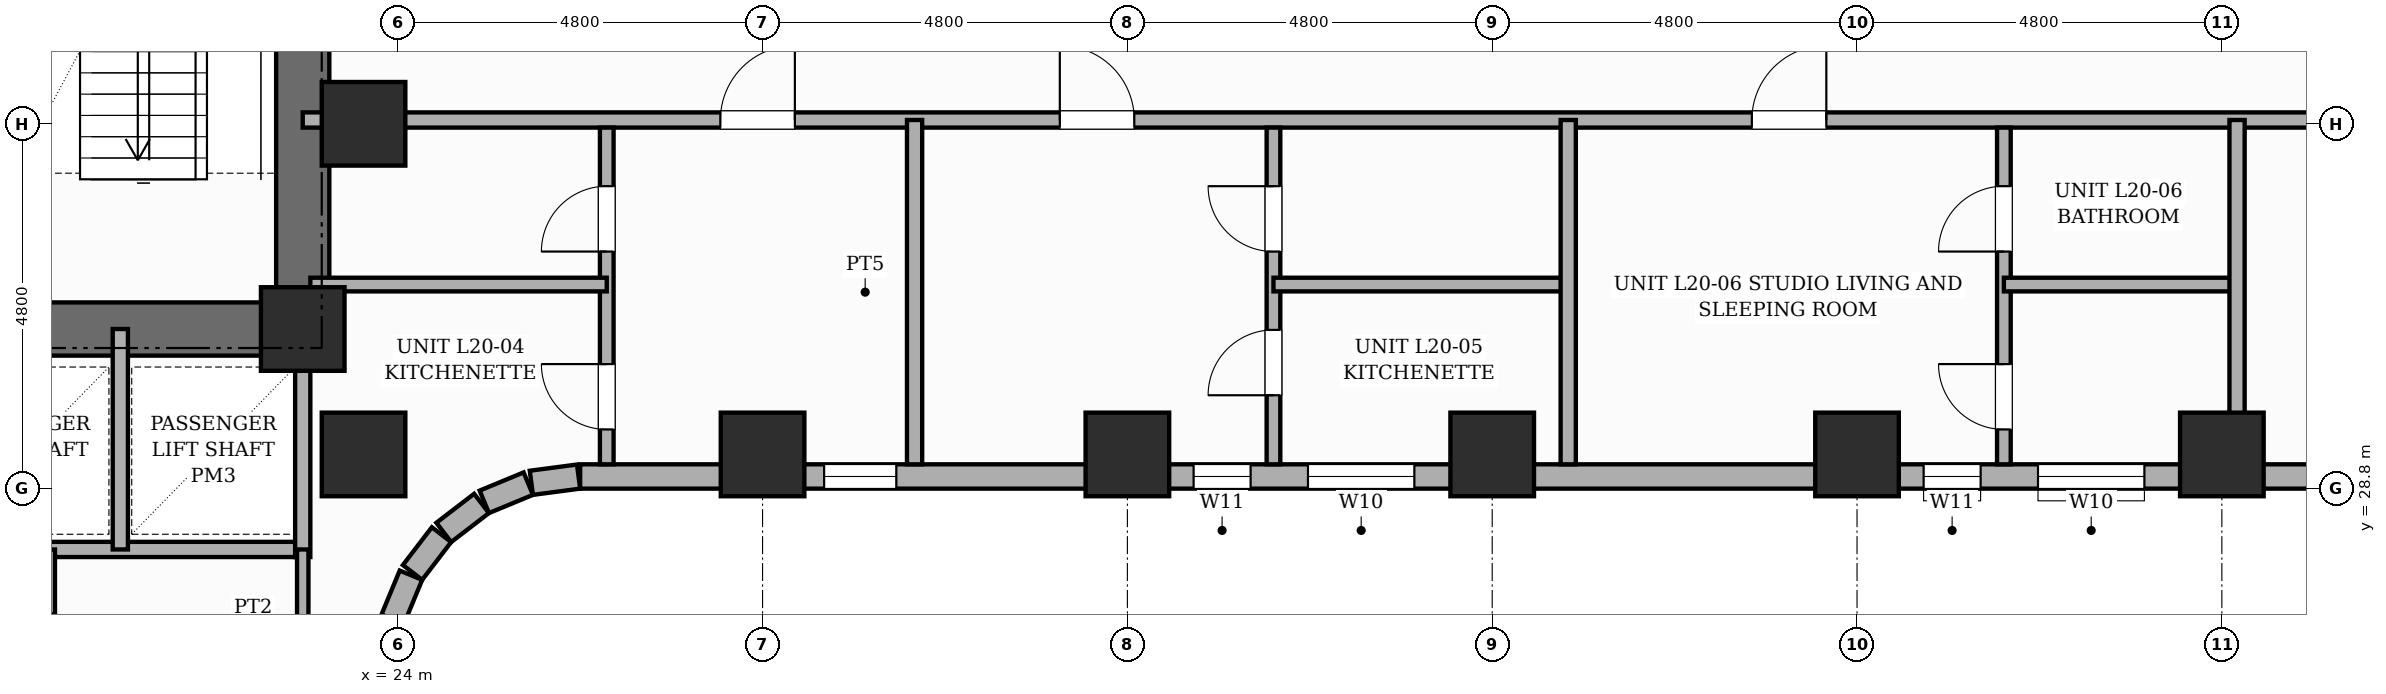
"""IFC4 building model, lengths in metres.
Left out: names, types, materials, properties, quantities, classifications, styles, units other than length and angle.
Written with IfcOpenShell. Run it as: python <this file> out.ifc"""

import sys

from ifc_helpers import new_model, si_unit, direction, frame, frame_2d, origin, origin_2d, place, context, subcontext, project, spatial, rectangle, extrude, element, fill, save


model = new_model("IFC4")
c1 = context("Model", 3, precision=1e-05, world=origin(), true_north=direction((0.0, 1.0)))
c2 = subcontext(c1, "Body", "Model", "MODEL_VIEW")
j1 = project(units=[si_unit("LENGTHUNIT", "METRE"), si_unit("PLANEANGLEUNIT", "RADIAN")], contexts=[c1])
p1 = place(None, origin())
s1 = spatial("IfcSite", under=j1, at=p1, CompositionType="ELEMENT")
p2 = place(p1, origin())
s2 = spatial("IfcBuilding", under=s1, at=p2, CompositionType="ELEMENT")
p3 = place(p2, frame((0.0, 0.0, 79.0)))
s3 = spatial("IfcBuildingStorey", under=s2, at=p3, CompositionType="ELEMENT", Elevation=79.0)
p4 = place(p3, frame((22.75, 30.55, 0.0), z_axis=(0.0, 0.0, 1.0), x_axis=(0.0, 1.0, 0.0)))
e1 = element("IfcWall", 1, at=p4, inside=s3, PredefinedType="SHEAR", context=c2, shape_type="SweptSolid", body=[
    extrude(rectangle(XDim=15.6, YDim=0.7, at=frame_2d((7.8, 0.0))), origin(), (0.0, 0.0, 1.0), 3.6),
])
p5 = place(p4, frame((10.8, 0.0, 0.0)))
e2 = element("IfcOpeningElement", 2, at=p5, cuts=e1, PredefinedType="OPENING", context=c2, shape_type="SweptSolid", body=[
    extrude(rectangle(XDim=1.0, YDim=2.15, at=frame_2d((0.5, 1.075))), frame((0.0, 0.36, 0.0), z_axis=(0.0, -1.0, 0.0), x_axis=(1.0, 0.0, 0.0)), (0.0, 0.0, 1.0), 0.72),
])
p6 = place(p3, frame((18.84, 30.9, 0.0), z_axis=(0.0, 0.0, 1.0), x_axis=(1.0, 0.0, 0.0)))
e3 = element("IfcWall", 3, at=p6, inside=s3, PredefinedType="SHEAR", context=c2, shape_type="SweptSolid", body=[
    extrude(rectangle(XDim=3.91, YDim=0.7, at=frame_2d((1.955, 0.0))), origin(), (0.0, 0.0, 1.0), 3.6),
])
for number, where, z_axis, x_axis in (
    (4, (22.75, 30.9, 0.0), (0.0, 0.0, 1.0), (1.0, 0.0, 0.0)),
    (5, (23.55, 29.25, 0.0), (0.0, 0.0, 1.0), (1.0, 0.0, 0.0)),
    (6, (23.55, 33.6, 0.0), (0.0, 0.0, 1.0), (1.0, 0.0, 0.0)),
    (7, (28.8, 29.25, 0.0), (0.0, 0.0, 1.0), (1.0, 0.0, 0.0)),
    (8, (33.6, 29.25, 0.0), (0.0, 0.0, 1.0), (1.0, 0.0, 0.0)),
    (9, (38.4, 29.25, 0.0), (0.0, 0.0, 1.0), (1.0, 0.0, 0.0)),
    (10, (43.2, 29.25, 0.0), (0.0, 0.0, 1.0), (1.0, 0.0, 0.0)),
    (11, (48.0, 29.25, 0.0), (0.0, 0.0, 1.0), (1.0, 0.0, 0.0)),
):
    element("IfcColumn", number, at=place(p3, frame(where, z_axis=z_axis, x_axis=x_axis)), inside=s3, PredefinedType="COLUMN", context=c2, shape_type="SweptSolid", body=[
        extrude(rectangle(XDim=1.1, YDim=1.1, at=origin_2d()), origin(), (0.0, 0.0, 1.0), 3.6),
    ])
p7 = place(p3, frame((55.2, 28.96, 0.0), z_axis=(0.0, 0.0, 1.0), x_axis=(-1.0, 0.0, 0.0)))
e12 = element("IfcWall", 12, at=p7, inside=s3, PredefinedType="STANDARD", context=c2, shape_type="SweptSolid", body=[
    extrude(rectangle(XDim=28.8, YDim=0.32, at=frame_2d((14.4, 0.0))), origin(), (0.0, 0.0, 1.0), 2.53),
])
p8 = place(p7, frame((24.64, 0.0, 0.45)))
e13 = element("IfcOpeningElement", 13, at=p8, cuts=e12, PredefinedType="OPENING", context=c2, shape_type="SweptSolid", body=[
    extrude(rectangle(XDim=0.95, YDim=1.8, at=frame_2d((0.475, 0.9))), frame((0.0, 0.17, 0.0), z_axis=(0.0, -1.0, 0.0), x_axis=(1.0, 0.0, 0.0)), (0.0, 0.0, 1.0), 0.34),
])
p9 = place(p7, frame((19.979, 0.0, 0.45)))
e14 = element("IfcOpeningElement", 14, at=p9, cuts=e12, PredefinedType="OPENING", context=c2, shape_type="SweptSolid", body=[
    extrude(rectangle(XDim=0.75, YDim=1.8, at=frame_2d((0.375, 0.9))), frame((0.0, 0.17, 0.0), z_axis=(0.0, -1.0, 0.0), x_axis=(1.0, 0.0, 0.0)), (0.0, 0.0, 1.0), 0.34),
])
p10 = place(p7, frame((10.374, 0.0, 0.45)))
e15 = element("IfcOpeningElement", 15, at=p10, cuts=e12, PredefinedType="OPENING", context=c2, shape_type="SweptSolid", body=[
    extrude(rectangle(XDim=0.75, YDim=1.8, at=frame_2d((0.375, 0.9))), frame((0.0, 0.17, 0.0), z_axis=(0.0, -1.0, 0.0), x_axis=(1.0, 0.0, 0.0)), (0.0, 0.0, 1.0), 0.34),
])
p11 = place(p7, frame((0.9, 0.0, 0.45)))
e16 = element("IfcOpeningElement", 16, at=p11, cuts=e12, PredefinedType="OPENING", context=c2, shape_type="SweptSolid", body=[
    extrude(rectangle(XDim=0.95, YDim=1.8, at=frame_2d((0.475, 0.9))), frame((0.0, 0.17, 0.0), z_axis=(0.0, -1.0, 0.0), x_axis=(1.0, 0.0, 0.0)), (0.0, 0.0, 1.0), 0.34),
])
p12 = place(p7, frame((17.824, 0.0, 0.65)))
e17 = element("IfcOpeningElement", 17, at=p12, cuts=e12, PredefinedType="OPENING", context=c2, shape_type="SweptSolid", body=[
    extrude(rectangle(XDim=1.4, YDim=1.1, at=frame_2d((0.7, 0.55))), frame((0.0, 0.17, 0.0), z_axis=(0.0, -1.0, 0.0), x_axis=(1.0, 0.0, 0.0)), (0.0, 0.0, 1.0), 0.34),
])
p13 = place(p7, frame((8.219, 0.0, 0.65)))
e18 = element("IfcOpeningElement", 18, at=p13, cuts=e12, PredefinedType="OPENING", context=c2, shape_type="SweptSolid", body=[
    extrude(rectangle(XDim=1.4, YDim=1.1, at=frame_2d((0.7, 0.55))), frame((0.0, 0.17, 0.0), z_axis=(0.0, -1.0, 0.0), x_axis=(1.0, 0.0, 0.0)), (0.0, 0.0, 1.0), 0.34),
])
p14 = place(p3, frame((26.379, 28.958, 0.0), z_axis=(0.0, 0.0, 1.0), x_axis=(-0.991447664465, -0.130504898859, 0.0)))
e19 = element("IfcWall", 19, at=p14, inside=s3, PredefinedType="STANDARD", context=c2, shape_type="SweptSolid", body=[
    extrude(rectangle(XDim=0.627, YDim=0.32, at=frame_2d((0.313, 0.0))), origin(), (0.0, 0.0, 1.0), 2.53),
])
p15 = place(p3, frame((25.718, 28.866, 0.0), z_axis=(0.0, 0.0, 1.0), x_axis=(-0.923836271867, -0.382787856107, 0.0)))
e20 = element("IfcWall", 20, at=p15, inside=s3, PredefinedType="STANDARD", context=c2, shape_type="SweptSolid", body=[
    extrude(rectangle(XDim=0.626, YDim=0.32, at=frame_2d((0.313, 0.0))), origin(), (0.0, 0.0, 1.0), 3.35),
])
for number, where, z_axis, x_axis in (
    (21, (25.103, 28.605, 0.0), (0.0, 0.0, 1.0), (-0.793, -0.609, 0.0)),
    (22, (24.576, 28.195, 0.0), (0.0, 0.0, 1.0), (-0.609, -0.793, 0.0)),
):
    element("IfcWall", number, at=place(p3, frame(where, z_axis=z_axis, x_axis=x_axis)), inside=s3, PredefinedType="STANDARD", context=c2, shape_type="SweptSolid", body=[
        extrude(rectangle(XDim=0.626, YDim=0.32, at=frame_2d((0.313, 0.0))), origin(), (0.0, 0.0, 1.0), 3.35),
    ])
p16 = place(p3, frame((24.174, 27.661, 0.0), z_axis=(0.0, 0.0, 1.0), x_axis=(-0.382455093999, -0.923974080304, 0.0)))
e23 = element("IfcWall", 23, at=p16, inside=s3, PredefinedType="STANDARD", context=c2, shape_type="SweptSolid", body=[
    extrude(rectangle(XDim=0.626, YDim=0.32, at=frame_2d((0.313, 0.0))), origin(), (0.0, 0.0, 1.0), 3.35),
])
p17 = place(p3, frame((15.5, 28.0, 0.0), z_axis=(0.0, 0.0, 1.0), x_axis=(1.0, 0.0, 0.0)))
e24 = element("IfcWall", 24, at=p17, inside=s3, PredefinedType="POLYGONAL", context=c2, shape_type="SweptSolid", body=[
    extrude(rectangle(XDim=7.25, YDim=0.2, at=frame_2d((3.625, 0.0))), origin(), (0.0, 0.0, 1.0), 3.35),
])
p18 = place(p3, frame((22.75, 27.9, 0.0), z_axis=(0.0, 0.0, 1.0), x_axis=(0.0, 1.0, 0.0)))
e25 = element("IfcWall", 25, at=p18, inside=s3, PredefinedType="POLYGONAL", context=c2, shape_type="SweptSolid", body=[
    extrude(rectangle(XDim=3.0, YDim=0.2, at=frame_2d((1.5, 0.0))), origin(), (0.0, 0.0, 1.0), 3.35),
])
p19 = place(p3, frame((20.35, 28.0, 0.0), z_axis=(0.0, 0.0, 1.0), x_axis=(0.0, 1.0, 0.0)))
e26 = element("IfcWall", 26, at=p19, inside=s3, PredefinedType="POLYGONAL", context=c2, shape_type="SweptSolid", body=[
    extrude(rectangle(XDim=2.9, YDim=0.2, at=frame_2d((1.45, 0.0))), origin(), (0.0, 0.0, 1.0), 3.35),
])
p20 = place(p3, frame((22.75, 25.75, 0.0), z_axis=(0.0, 0.0, 1.0), x_axis=(0.0, 1.0, 0.0)))
e27 = element("IfcWall", 27, at=p20, inside=s3, PredefinedType="PARTITIONING", context=c2, shape_type="SweptSolid", body=[
    extrude(rectangle(XDim=2.25, YDim=0.15, at=frame_2d((1.125, 0.0))), origin(), (0.0, 0.0, 1.0), 3.35),
])
p21 = place(p3, frame((19.4, 25.75, 0.0), z_axis=(0.0, 0.0, 1.0), x_axis=(0.0, 1.0, 0.0)))
e28 = element("IfcWall", 28, at=p21, inside=s3, PredefinedType="PLUMBINGWALL", context=c2, shape_type="SweptSolid", body=[
    extrude(rectangle(XDim=2.25, YDim=0.18, at=frame_2d((1.125, 0.0))), origin(), (0.0, 0.0, 1.0), 3.35),
])
p22 = place(p21, frame((0.55, 0.0, 0.0)))
e29 = element("IfcOpeningElement", 29, at=p22, cuts=e28, PredefinedType="OPENING", context=c2, shape_type="SweptSolid", body=[
    extrude(rectangle(XDim=0.86, YDim=2.1, at=frame_2d((0.43, 1.05))), frame((0.0, 0.1, 0.0), z_axis=(0.0, -1.0, 0.0), x_axis=(1.0, 0.0, 0.0)), (0.0, 0.0, 1.0), 0.2),
])
p23 = place(p3, frame((22.75, 33.65, 0.0), z_axis=(0.0, 0.0, 1.0), x_axis=(1.0, 0.0, 0.0)))
e30 = element("IfcWall", 30, at=p23, inside=s3, PredefinedType="PARTITIONING", context=c2, shape_type="SweptSolid", body=[
    extrude(rectangle(XDim=34.53, YDim=0.2, at=frame_2d((17.265, 0.0))), origin(), (0.0, 0.0, 1.0), 2.53),
])
p24 = place(p23, frame((5.495, 0.0, 0.0)))
e31 = element("IfcOpeningElement", 31, at=p24, cuts=e30, PredefinedType="OPENING", context=c2, shape_type="SweptSolid", body=[
    extrude(rectangle(XDim=0.98, YDim=2.18, at=frame_2d((0.49, 1.09))), frame((0.0, 0.11, 0.0), z_axis=(0.0, -1.0, 0.0), x_axis=(1.0, 0.0, 0.0)), (0.0, 0.0, 1.0), 0.22),
])
p25 = place(p23, frame((9.961, 0.0, 0.0)))
e32 = element("IfcOpeningElement", 32, at=p25, cuts=e30, PredefinedType="OPENING", context=c2, shape_type="SweptSolid", body=[
    extrude(rectangle(XDim=0.98, YDim=2.18, at=frame_2d((0.49, 1.09))), frame((0.0, 0.11, 0.0), z_axis=(0.0, -1.0, 0.0), x_axis=(1.0, 0.0, 0.0)), (0.0, 0.0, 1.0), 0.22),
])
p26 = place(p23, frame((19.066, 0.0, 0.0)))
e33 = element("IfcOpeningElement", 33, at=p26, cuts=e30, PredefinedType="OPENING", context=c2, shape_type="SweptSolid", body=[
    extrude(rectangle(XDim=0.98, YDim=2.18, at=frame_2d((0.49, 1.09))), frame((0.0, 0.11, 0.0), z_axis=(0.0, -1.0, 0.0), x_axis=(1.0, 0.0, 0.0)), (0.0, 0.0, 1.0), 0.22),
])
p27 = place(p23, frame((27.815, 0.0, 0.0)))
e34 = element("IfcOpeningElement", 34, at=p27, cuts=e30, PredefinedType="OPENING", context=c2, shape_type="SweptSolid", body=[
    extrude(rectangle(XDim=0.98, YDim=2.18, at=frame_2d((0.49, 1.09))), frame((0.0, 0.11, 0.0), z_axis=(0.0, -1.0, 0.0), x_axis=(1.0, 0.0, 0.0)), (0.0, 0.0, 1.0), 0.22),
])
p28 = place(p3, frame((26.75, 29.12, 0.0), z_axis=(0.0, 0.0, 1.0), x_axis=(0.0, 1.0, 0.0)))
e35 = element("IfcWall", 35, at=p28, inside=s3, PredefinedType="PLUMBINGWALL", context=c2, shape_type="SweptSolid", body=[
    extrude(rectangle(XDim=4.43, YDim=0.18, at=frame_2d((2.215, 0.0))), origin(), (0.0, 0.0, 1.0), 3.35),
])
p29 = place(p28, frame((0.459, 0.0, 0.0)))
e36 = element("IfcOpeningElement", 36, at=p29, cuts=e35, PredefinedType="OPENING", context=c2, shape_type="SweptSolid", body=[
    extrude(rectangle(XDim=0.86, YDim=2.1, at=frame_2d((0.43, 1.05))), frame((0.0, 0.1, 0.0), z_axis=(0.0, -1.0, 0.0), x_axis=(1.0, 0.0, 0.0)), (0.0, 0.0, 1.0), 0.2),
])
p30 = place(p28, frame((2.799, 0.0, 0.0)))
e37 = element("IfcOpeningElement", 37, at=p30, cuts=e35, PredefinedType="OPENING", context=c2, shape_type="SweptSolid", body=[
    extrude(rectangle(XDim=0.86, YDim=2.1, at=frame_2d((0.43, 1.05))), frame((0.0, 0.1, 0.0), z_axis=(0.0, -1.0, 0.0), x_axis=(1.0, 0.0, 0.0)), (0.0, 0.0, 1.0), 0.2),
])
p31 = place(p3, frame((22.85, 31.485, 0.0), z_axis=(0.0, 0.0, 1.0), x_axis=(1.0, 0.0, 0.0)))
e38 = element("IfcWall", 38, at=p31, inside=s3, PredefinedType="PLUMBINGWALL", context=c2, shape_type="SweptSolid", body=[
    extrude(rectangle(XDim=3.9, YDim=0.18, at=frame_2d((1.95, 0.0))), origin(), (0.0, 0.0, 1.0), 3.35),
])
p32 = place(p3, frame((30.8, 29.12, 0.0), z_axis=(0.0, 0.0, 1.0), x_axis=(0.0, 1.0, 0.0)))
e39 = element("IfcWall", 39, at=p32, inside=s3, PredefinedType="SOLIDWALL", context=c2, shape_type="SweptSolid", body=[
    extrude(rectangle(XDim=4.53, YDim=0.2, at=frame_2d((2.265, 0.0))), origin(), (0.0, 0.0, 1.0), 3.35),
])
p33 = place(p3, frame((35.522, 29.12, 0.0), z_axis=(0.0, 0.0, 1.0), x_axis=(0.0, 1.0, 0.0)))
e40 = element("IfcWall", 40, at=p33, inside=s3, PredefinedType="PLUMBINGWALL", context=c2, shape_type="SweptSolid", body=[
    extrude(rectangle(XDim=4.43, YDim=0.18, at=frame_2d((2.215, 0.0))), origin(), (0.0, 0.0, 1.0), 3.35),
])
p34 = place(p33, frame((0.909, 0.0, 0.0)))
e41 = element("IfcOpeningElement", 41, at=p34, cuts=e40, PredefinedType="OPENING", context=c2, shape_type="SweptSolid", body=[
    extrude(rectangle(XDim=0.86, YDim=2.1, at=frame_2d((0.43, 1.05))), frame((0.0, 0.1, 0.0), z_axis=(0.0, -1.0, 0.0), x_axis=(1.0, 0.0, 0.0)), (0.0, 0.0, 1.0), 0.2),
])
p35 = place(p33, frame((2.799, 0.0, 0.0)))
e42 = element("IfcOpeningElement", 42, at=p35, cuts=e40, PredefinedType="OPENING", context=c2, shape_type="SweptSolid", body=[
    extrude(rectangle(XDim=0.86, YDim=2.1, at=frame_2d((0.43, 1.05))), frame((0.0, 0.1, 0.0), z_axis=(0.0, -1.0, 0.0), x_axis=(1.0, 0.0, 0.0)), (0.0, 0.0, 1.0), 0.2),
])
p36 = place(p3, frame((35.522, 31.485, 0.0), z_axis=(0.0, 0.0, 1.0), x_axis=(1.0, 0.0, 0.0)))
e43 = element("IfcWall", 43, at=p36, inside=s3, PredefinedType="PLUMBINGWALL", context=c2, shape_type="SweptSolid", body=[
    extrude(rectangle(XDim=3.878, YDim=0.18, at=frame_2d((1.939, 0.0))), origin(), (0.0, 0.0, 1.0), 3.35),
])
p37 = place(p3, frame((39.4, 29.12, 0.0), z_axis=(0.0, 0.0, 1.0), x_axis=(0.0, 1.0, 0.0)))
e44 = element("IfcWall", 44, at=p37, inside=s3, PredefinedType="SOLIDWALL", context=c2, shape_type="SweptSolid", body=[
    extrude(rectangle(XDim=4.53, YDim=0.2, at=frame_2d((2.265, 0.0))), origin(), (0.0, 0.0, 1.0), 3.35),
])
p38 = place(p3, frame((45.132, 29.12, 0.0), z_axis=(0.0, 0.0, 1.0), x_axis=(0.0, 1.0, 0.0)))
e45 = element("IfcWall", 45, at=p38, inside=s3, PredefinedType="PLUMBINGWALL", context=c2, shape_type="SweptSolid", body=[
    extrude(rectangle(XDim=4.43, YDim=0.18, at=frame_2d((2.215, 0.0))), origin(), (0.0, 0.0, 1.0), 3.35),
])
p39 = place(p38, frame((0.459, 0.0, 0.0)))
e46 = element("IfcOpeningElement", 46, at=p39, cuts=e45, PredefinedType="OPENING", context=c2, shape_type="SweptSolid", body=[
    extrude(rectangle(XDim=0.86, YDim=2.1, at=frame_2d((0.43, 1.05))), frame((0.0, 0.1, 0.0), z_axis=(0.0, -1.0, 0.0), x_axis=(1.0, 0.0, 0.0)), (0.0, 0.0, 1.0), 0.2),
])
p40 = place(p38, frame((2.799, 0.0, 0.0)))
e47 = element("IfcOpeningElement", 47, at=p40, cuts=e45, PredefinedType="OPENING", context=c2, shape_type="SweptSolid", body=[
    extrude(rectangle(XDim=0.86, YDim=2.1, at=frame_2d((0.43, 1.05))), frame((0.0, 0.1, 0.0), z_axis=(0.0, -1.0, 0.0), x_axis=(1.0, 0.0, 0.0)), (0.0, 0.0, 1.0), 0.2),
])
p41 = place(p3, frame((45.132, 31.485, 0.0), z_axis=(0.0, 0.0, 1.0), x_axis=(1.0, 0.0, 0.0)))
e48 = element("IfcWall", 48, at=p41, inside=s3, PredefinedType="PLUMBINGWALL", context=c2, shape_type="SweptSolid", body=[
    extrude(rectangle(XDim=3.068, YDim=0.18, at=frame_2d((1.534, 0.0))), origin(), (0.0, 0.0, 1.0), 3.35),
])
p42 = place(p3, frame((48.2, 29.12, 0.0), z_axis=(0.0, 0.0, 1.0), x_axis=(0.0, 1.0, 0.0)))
e49 = element("IfcWall", 49, at=p42, inside=s3, PredefinedType="SOLIDWALL", context=c2, shape_type="SweptSolid", body=[
    extrude(rectangle(XDim=4.53, YDim=0.2, at=frame_2d((2.265, 0.0))), origin(), (0.0, 0.0, 1.0), 2.53),
])
p43 = place(p8, origin())
e50 = element("IfcWindow", 50, at=p43, inside=s3, PartitioningType="SINGLE_PANEL", PredefinedType="WINDOW", context=c2, shape_type="SweptSolid", body=[
    extrude(rectangle(XDim=0.95, YDim=1.8, at=frame_2d((0.475, 0.9))), frame((0.0, 0.03, 0.0), z_axis=(0.0, -1.0, 0.0), x_axis=(1.0, 0.0, 0.0)), (0.0, 0.0, 1.0), 0.06),
])
fill(e13, e50)
p44 = place(p9, origin())
e51 = element("IfcWindow", 51, at=p44, inside=s3, PartitioningType="SINGLE_PANEL", PredefinedType="WINDOW", context=c2, shape_type="SweptSolid", body=[
    extrude(rectangle(XDim=0.75, YDim=1.8, at=frame_2d((0.375, 0.9))), frame((0.0, 0.03, 0.0), z_axis=(0.0, -1.0, 0.0), x_axis=(1.0, 0.0, 0.0)), (0.0, 0.0, 1.0), 0.06),
])
fill(e14, e51)
p45 = place(p10, origin())
e52 = element("IfcWindow", 52, at=p45, inside=s3, PartitioningType="SINGLE_PANEL", PredefinedType="WINDOW", context=c2, shape_type="SweptSolid", body=[
    extrude(rectangle(XDim=0.75, YDim=1.8, at=frame_2d((0.375, 0.9))), frame((0.0, 0.03, 0.0), z_axis=(0.0, -1.0, 0.0), x_axis=(1.0, 0.0, 0.0)), (0.0, 0.0, 1.0), 0.06),
])
fill(e15, e52)
p46 = place(p12, origin())
e53 = element("IfcWindow", 53, at=p46, inside=s3, PartitioningType="SINGLE_PANEL", PredefinedType="WINDOW", context=c2, shape_type="SweptSolid", body=[
    extrude(rectangle(XDim=1.4, YDim=1.1, at=frame_2d((0.7, 0.55))), frame((0.0, 0.03, 0.0), z_axis=(0.0, -1.0, 0.0), x_axis=(1.0, 0.0, 0.0)), (0.0, 0.0, 1.0), 0.06),
])
fill(e17, e53)
p47 = place(p13, origin())
e54 = element("IfcWindow", 54, at=p47, inside=s3, PartitioningType="SINGLE_PANEL", PredefinedType="WINDOW", context=c2, shape_type="SweptSolid", body=[
    extrude(rectangle(XDim=1.4, YDim=1.1, at=frame_2d((0.7, 0.55))), frame((0.0, 0.03, 0.0), z_axis=(0.0, -1.0, 0.0), x_axis=(1.0, 0.0, 0.0)), (0.0, 0.0, 1.0), 0.06),
])
fill(e18, e54)
p48 = place(p24, origin())
e55 = element("IfcDoor", 55, at=p48, inside=s3, OperationType="SINGLE_SWING_RIGHT", PredefinedType="DOOR", context=c2, shape_type="SweptSolid", body=[
    extrude(rectangle(XDim=0.98, YDim=2.18, at=frame_2d((0.49, 1.09))), frame((0.0, 0.025, 0.0), z_axis=(0.0, -1.0, 0.0), x_axis=(1.0, 0.0, 0.0)), (0.0, 0.0, 1.0), 0.05),
])
fill(e31, e55)
p49 = place(p29, origin())
e56 = element("IfcDoor", 56, at=p49, inside=s3, OperationType="SINGLE_SWING_RIGHT", PredefinedType="DOOR", context=c2, shape_type="SweptSolid", body=[
    extrude(rectangle(XDim=0.86, YDim=2.1, at=frame_2d((0.43, 1.05))), frame((0.0, 0.025, 0.0), z_axis=(0.0, -1.0, 0.0), x_axis=(1.0, 0.0, 0.0)), (0.0, 0.0, 1.0), 0.05),
])
fill(e36, e56)
p50 = place(p30, origin())
e57 = element("IfcDoor", 57, at=p50, inside=s3, OperationType="SINGLE_SWING_LEFT", PredefinedType="DOOR", context=c2, shape_type="SweptSolid", body=[
    extrude(rectangle(XDim=0.86, YDim=2.1, at=frame_2d((0.43, 1.05))), frame((0.0, 0.025, 0.0), z_axis=(0.0, -1.0, 0.0), x_axis=(1.0, 0.0, 0.0)), (0.0, 0.0, 1.0), 0.05),
])
fill(e37, e57)
p51 = place(p25, origin())
e58 = element("IfcDoor", 58, at=p51, inside=s3, OperationType="SINGLE_SWING_LEFT", PredefinedType="DOOR", context=c2, shape_type="SweptSolid", body=[
    extrude(rectangle(XDim=0.98, YDim=2.18, at=frame_2d((0.49, 1.09))), frame((0.0, 0.025, 0.0), z_axis=(0.0, -1.0, 0.0), x_axis=(1.0, 0.0, 0.0)), (0.0, 0.0, 1.0), 0.05),
])
fill(e32, e58)
p52 = place(p34, origin())
e59 = element("IfcDoor", 59, at=p52, inside=s3, OperationType="SINGLE_SWING_LEFT", PredefinedType="DOOR", context=c2, shape_type="SweptSolid", body=[
    extrude(rectangle(XDim=0.86, YDim=2.1, at=frame_2d((0.43, 1.05))), frame((0.0, 0.025, 0.0), z_axis=(0.0, -1.0, 0.0), x_axis=(1.0, 0.0, 0.0)), (0.0, 0.0, 1.0), 0.05),
])
fill(e41, e59)
p53 = place(p35, origin())
e60 = element("IfcDoor", 60, at=p53, inside=s3, OperationType="SINGLE_SWING_RIGHT", PredefinedType="DOOR", context=c2, shape_type="SweptSolid", body=[
    extrude(rectangle(XDim=0.86, YDim=2.1, at=frame_2d((0.43, 1.05))), frame((0.0, 0.025, 0.0), z_axis=(0.0, -1.0, 0.0), x_axis=(1.0, 0.0, 0.0)), (0.0, 0.0, 1.0), 0.05),
])
fill(e42, e60)
p54 = place(p26, origin())
e61 = element("IfcDoor", 61, at=p54, inside=s3, OperationType="SINGLE_SWING_RIGHT", PredefinedType="DOOR", context=c2, shape_type="SweptSolid", body=[
    extrude(rectangle(XDim=0.98, YDim=2.18, at=frame_2d((0.49, 1.09))), frame((0.0, 0.025, 0.0), z_axis=(0.0, -1.0, 0.0), x_axis=(1.0, 0.0, 0.0)), (0.0, 0.0, 1.0), 0.05),
])
fill(e33, e61)
p55 = place(p39, origin())
e62 = element("IfcDoor", 62, at=p55, inside=s3, OperationType="SINGLE_SWING_RIGHT", PredefinedType="DOOR", context=c2, shape_type="SweptSolid", body=[
    extrude(rectangle(XDim=0.86, YDim=2.1, at=frame_2d((0.43, 1.05))), frame((0.0, 0.025, 0.0), z_axis=(0.0, -1.0, 0.0), x_axis=(1.0, 0.0, 0.0)), (0.0, 0.0, 1.0), 0.05),
])
fill(e46, e62)
p56 = place(p40, origin())
e63 = element("IfcDoor", 63, at=p56, inside=s3, OperationType="SINGLE_SWING_LEFT", PredefinedType="DOOR", context=c2, shape_type="SweptSolid", body=[
    extrude(rectangle(XDim=0.86, YDim=2.1, at=frame_2d((0.43, 1.05))), frame((0.0, 0.025, 0.0), z_axis=(0.0, -1.0, 0.0), x_axis=(1.0, 0.0, 0.0)), (0.0, 0.0, 1.0), 0.05),
])
fill(e47, e63)
save(model, sys.argv[1])
